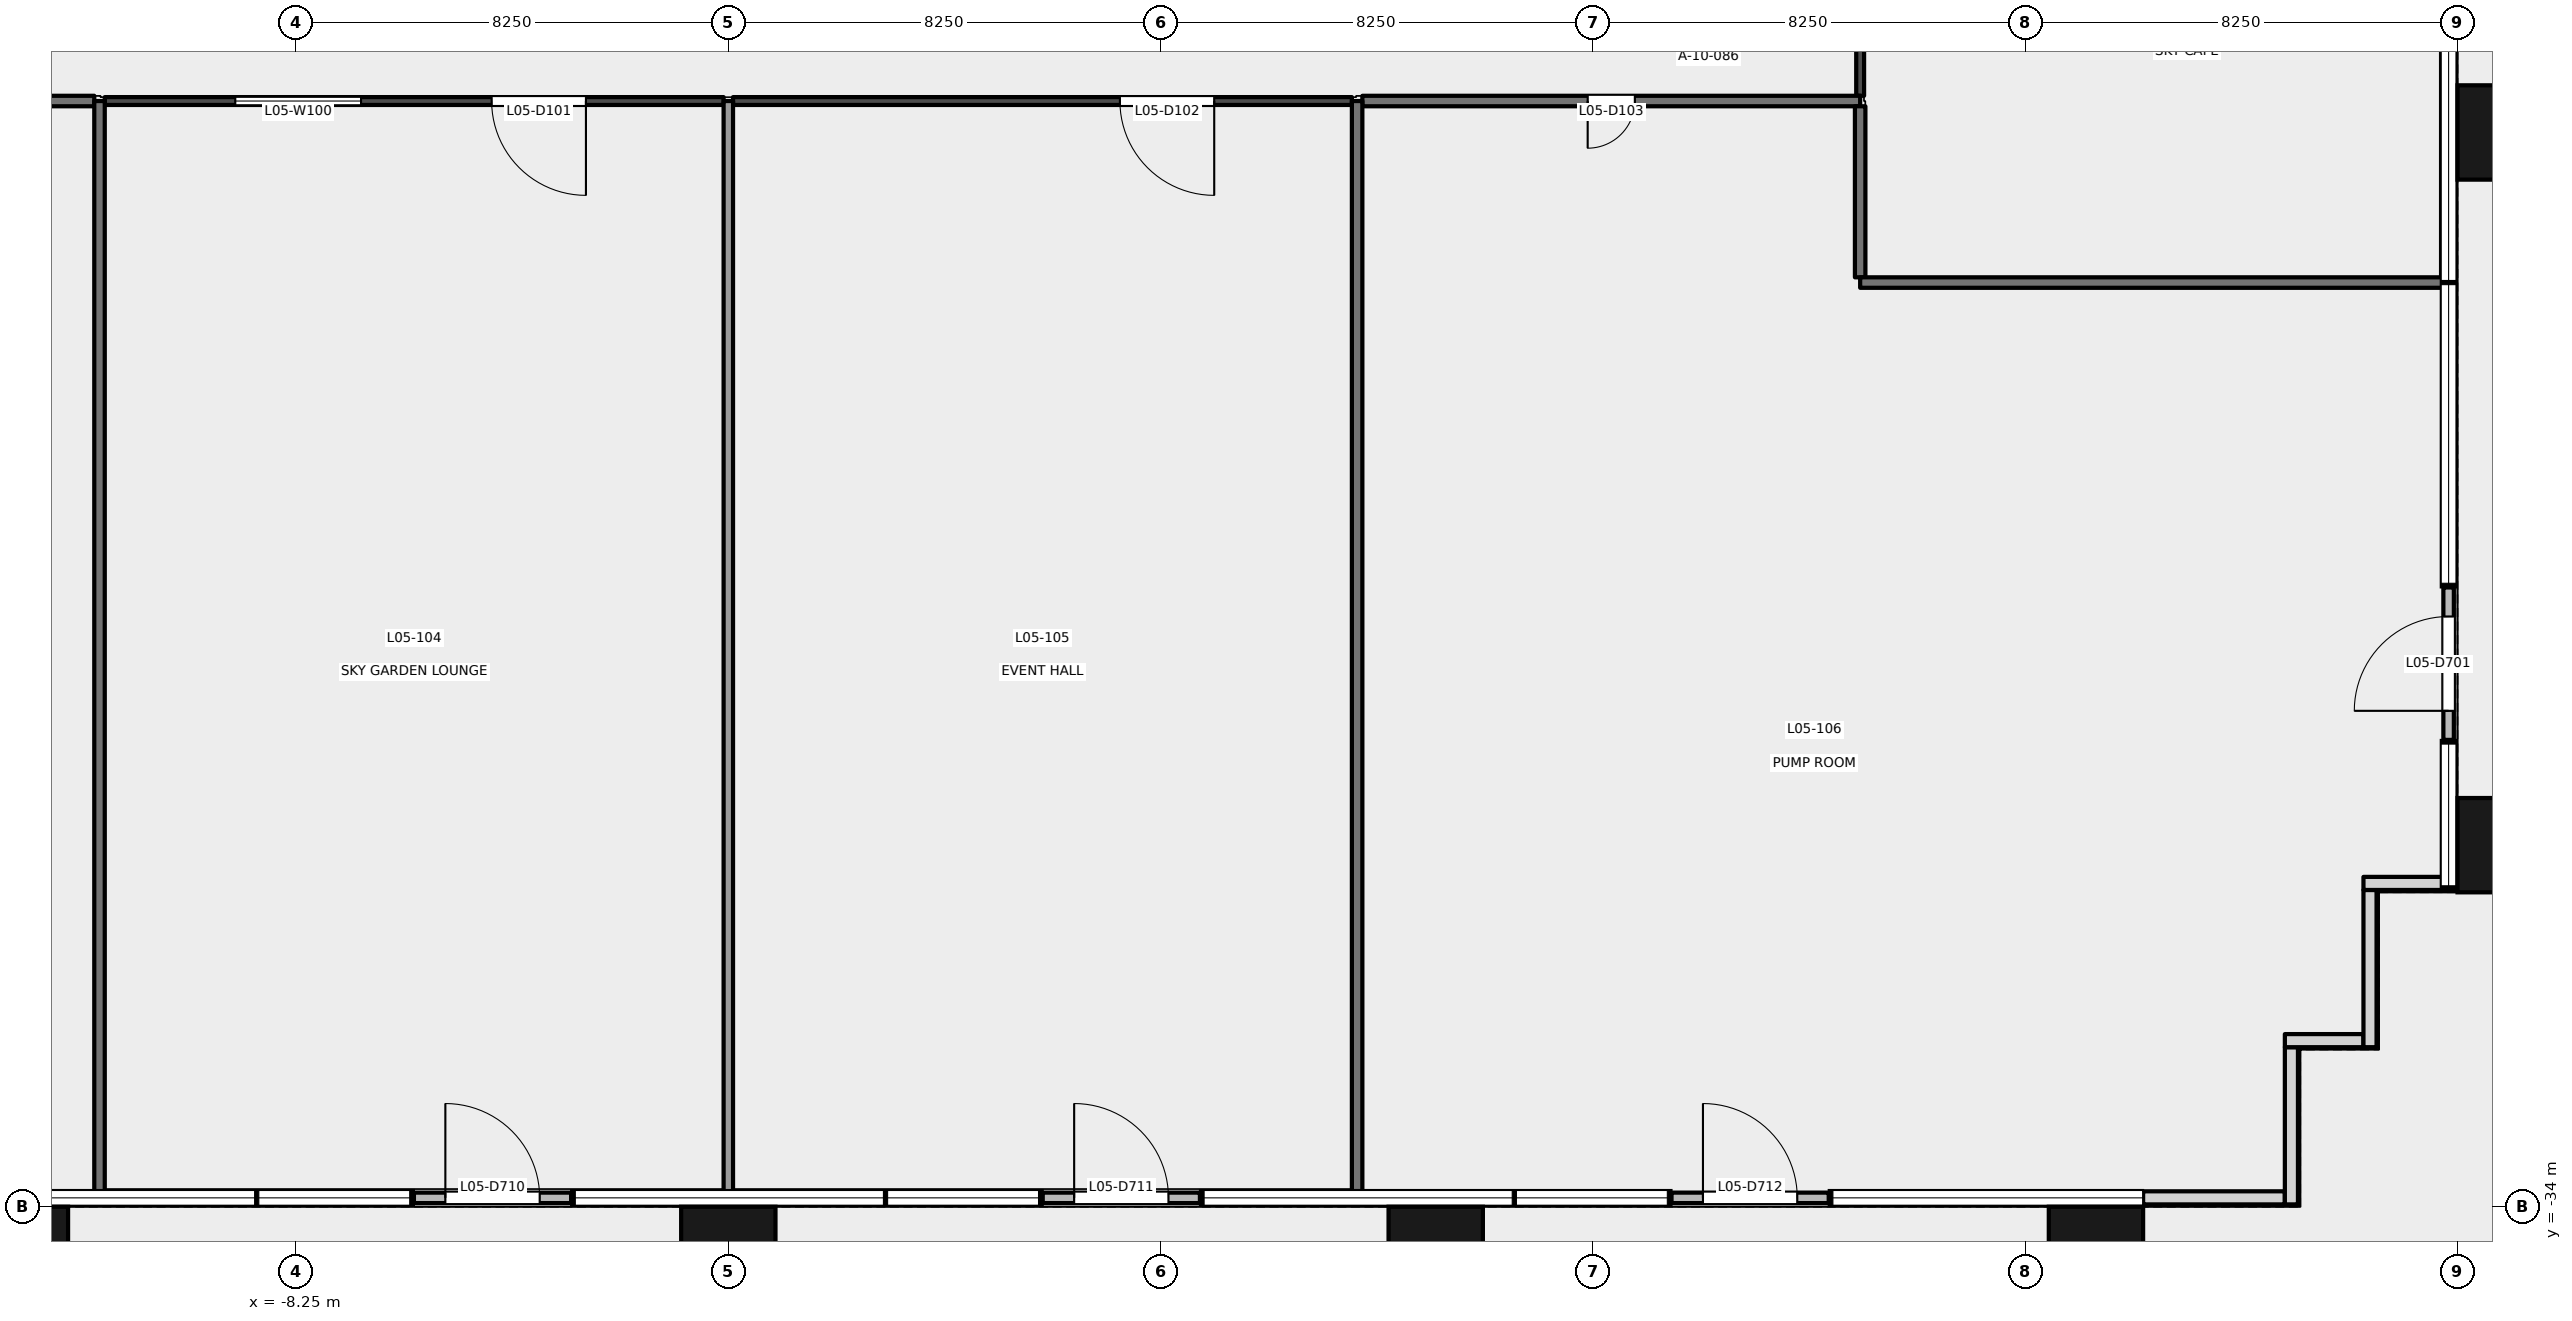
"""IFC4 building model, lengths in metres.
Left out: names, types, materials, properties, quantities, classifications, styles, units other than length and angle.
Written with IfcOpenShell. Run it as: python <this file> out.ifc"""

import sys

from ifc_helpers import new_model, si_unit, direction, frame, frame_2d, origin, origin_2d, place, context, subcontext, project, spatial, rectangle, extrude, element, fill, save


model = new_model("IFC4")
c1 = context("Model", 3, precision=1e-05, world=origin(), true_north=direction((0.0, 1.0)))
c2 = subcontext(c1, "Body", "Model", "MODEL_VIEW")
j1 = project(units=[si_unit("LENGTHUNIT", "METRE"), si_unit("PLANEANGLEUNIT", "RADIAN")], contexts=[c1])
p1 = place(None, origin())
s1 = spatial("IfcSite", under=j1, at=p1, CompositionType="ELEMENT")
p2 = place(p1, origin())
s2 = spatial("IfcBuilding", under=s1, at=p2, CompositionType="ELEMENT")
p3 = place(p2, frame((0.0, 0.0, 27.0)))
s3 = spatial("IfcBuildingStorey", under=s2, at=p3, CompositionType="ELEMENT", Elevation=27.0)
for number, where, z_axis, x_axis in (
    (1, (-13.5, -34.9, -0.2), (0.0, 0.0, 1.0), (1.0, 0.0, 0.0)),
    (2, (0.0, -34.9, -0.2), (0.0, 0.0, 1.0), (1.0, 0.0, 0.0)),
    (3, (13.5, -34.9, -0.2), (0.0, 0.0, 1.0), (1.0, 0.0, 0.0)),
    (4, (26.1, -34.9, -0.2), (0.0, 0.0, 1.0), (1.0, 0.0, 0.0)),
    (5, (33.9, -27.1, -0.2), (0.0, 0.0, 1.0), (0.0, 1.0, 0.0)),
    (6, (33.9, -13.5, -0.2), (0.0, 0.0, 1.0), (0.0, 1.0, 0.0)),
):
    element("IfcColumn", number, at=place(p3, frame(where, z_axis=z_axis, x_axis=x_axis)), inside=s3, PredefinedType="COLUMN", context=c2, shape_type="SweptSolid", body=[
        extrude(rectangle(XDim=1.8, YDim=1.8, at=origin_2d()), origin(), (0.0, 0.0, 1.0), 5.4),
    ])
p4 = place(p3, frame((27.0, -33.83, 0.0), z_axis=(0.0, 0.0, 1.0), x_axis=(1.0, 0.0, 0.0)))
e7 = element("IfcWall", 7, at=p4, inside=s3, PredefinedType="SOLIDWALL", context=c2, shape_type="SweptSolid", body=[
    extrude(rectangle(XDim=2.705, YDim=0.25, at=frame_2d((1.353, 0.0))), origin(), (0.0, 0.0, 1.0), 5.2),
])
p5 = place(p3, frame((29.83, -33.955, 0.0), z_axis=(0.0, 0.0, 1.0), x_axis=(0.0, 1.0, 0.0)))
e8 = element("IfcWall", 8, at=p5, inside=s3, PredefinedType="SOLIDWALL", context=c2, shape_type="SweptSolid", body=[
    extrude(rectangle(XDim=3.0, YDim=0.25, at=frame_2d((1.5, 0.0))), origin(), (0.0, 0.0, 1.0), 5.2),
])
p6 = place(p3, frame((29.705, -30.83, 0.0), z_axis=(0.0, 0.0, 1.0), x_axis=(1.0, 0.0, 0.0)))
e9 = element("IfcWall", 9, at=p6, inside=s3, PredefinedType="SOLIDWALL", context=c2, shape_type="SweptSolid", body=[
    extrude(rectangle(XDim=1.5, YDim=0.25, at=frame_2d((0.75, 0.0))), origin(), (0.0, 0.0, 1.0), 5.2),
])
p7 = place(p3, frame((31.33, -30.955, 0.0), z_axis=(0.0, 0.0, 1.0), x_axis=(0.0, 1.0, 0.0)))
e10 = element("IfcWall", 10, at=p7, inside=s3, PredefinedType="SOLIDWALL", context=c2, shape_type="SweptSolid", body=[
    extrude(rectangle(XDim=3.0, YDim=0.25, at=frame_2d((1.5, 0.0))), origin(), (0.0, 0.0, 1.0), 5.2),
])
p8 = place(p3, frame((31.205, -27.83, 0.0), z_axis=(0.0, 0.0, 1.0), x_axis=(1.0, 0.0, 0.0)))
e11 = element("IfcWall", 11, at=p8, inside=s3, PredefinedType="SOLIDWALL", context=c2, shape_type="SweptSolid", body=[
    extrude(rectangle(XDim=1.8, YDim=0.25, at=frame_2d((0.9, 0.0))), origin(), (0.0, 0.0, 1.0), 5.2),
])
p9 = place(p3, frame((32.83, -25.091, 0.0), z_axis=(0.0, 0.0, 1.0), x_axis=(0.0, 1.0, 0.0)))
e12 = element("IfcWall", 12, at=p9, inside=s3, PredefinedType="SOLIDWALL", context=c2, shape_type="SweptSolid", body=[
    extrude(rectangle(XDim=2.909, YDim=0.2, at=frame_2d((1.455, 0.0))), origin(), (0.0, 0.0, 1.0), 4.1),
])
p10 = place(p9, frame((0.554, 0.0, 0.0)))
e13 = element("IfcOpeningElement", 13, at=p10, cuts=e12, PredefinedType="OPENING", context=c2, shape_type="SweptSolid", body=[
    extrude(rectangle(XDim=1.8, YDim=2.4, at=frame_2d((0.9, 1.2))), frame((0.0, 0.111, 0.0), z_axis=(0.0, -1.0, 0.0), x_axis=(1.0, 0.0, 0.0)), (0.0, 0.0, 1.0), 0.221),
])
p11 = place(p3, frame((-6.0, -33.83, 0.0), z_axis=(0.0, 0.0, 1.0), x_axis=(1.0, 0.0, 0.0)))
e14 = element("IfcWall", 14, at=p11, inside=s3, PredefinedType="SOLIDWALL", context=c2, shape_type="SweptSolid", body=[
    extrude(rectangle(XDim=3.0, YDim=0.2, at=frame_2d((1.5, 0.0))), origin(), (0.0, 0.0, 1.0), 4.1),
])
p12 = place(p11, frame((0.6, 0.0, 0.0)))
e15 = element("IfcOpeningElement", 15, at=p12, cuts=e14, PredefinedType="OPENING", context=c2, shape_type="SweptSolid", body=[
    extrude(rectangle(XDim=1.8, YDim=2.4, at=frame_2d((0.9, 1.2))), frame((0.0, 0.111, 0.0), z_axis=(0.0, -1.0, 0.0), x_axis=(1.0, 0.0, 0.0)), (0.0, 0.0, 1.0), 0.221),
])
p13 = place(p3, frame((6.0, -33.83, 0.0), z_axis=(0.0, 0.0, 1.0), x_axis=(1.0, 0.0, 0.0)))
e16 = element("IfcWall", 16, at=p13, inside=s3, PredefinedType="SOLIDWALL", context=c2, shape_type="SweptSolid", body=[
    extrude(rectangle(XDim=3.0, YDim=0.2, at=frame_2d((1.5, 0.0))), origin(), (0.0, 0.0, 1.0), 4.1),
])
p14 = place(p13, frame((0.6, 0.0, 0.0)))
e17 = element("IfcOpeningElement", 17, at=p14, cuts=e16, PredefinedType="OPENING", context=c2, shape_type="SweptSolid", body=[
    extrude(rectangle(XDim=1.8, YDim=2.4, at=frame_2d((0.9, 1.2))), frame((0.0, 0.111, 0.0), z_axis=(0.0, -1.0, 0.0), x_axis=(1.0, 0.0, 0.0)), (0.0, 0.0, 1.0), 0.221),
])
p15 = place(p3, frame((18.0, -33.83, 0.0), z_axis=(0.0, 0.0, 1.0), x_axis=(1.0, 0.0, 0.0)))
e18 = element("IfcWall", 18, at=p15, inside=s3, PredefinedType="SOLIDWALL", context=c2, shape_type="SweptSolid", body=[
    extrude(rectangle(XDim=3.0, YDim=0.2, at=frame_2d((1.5, 0.0))), origin(), (0.0, 0.0, 1.0), 4.1),
])
p16 = place(p15, frame((0.6, 0.0, 0.0)))
e19 = element("IfcOpeningElement", 19, at=p16, cuts=e18, PredefinedType="OPENING", context=c2, shape_type="SweptSolid", body=[
    extrude(rectangle(XDim=1.8, YDim=2.4, at=frame_2d((0.9, 1.2))), frame((0.0, 0.111, 0.0), z_axis=(0.0, -1.0, 0.0), x_axis=(1.0, 0.0, 0.0)), (0.0, 0.0, 1.0), 0.221),
])
p17 = place(p3, frame((-0.09, -12.9, 0.0), z_axis=(0.0, 0.0, 1.0), x_axis=(-1.0, 0.0, 0.0)))
e20 = element("IfcWall", 20, at=p17, inside=s3, PredefinedType="PARTITIONING", context=c2, shape_type="SweptSolid", body=[
    extrude(rectangle(XDim=11.81, YDim=0.15, at=frame_2d((5.905, 0.0))), origin(), (0.0, 0.0, 1.0), 4.2),
])
p18 = place(p17, frame((2.627, 0.0, 0.0)))
e21 = element("IfcOpeningElement", 21, at=p18, cuts=e20, PredefinedType="OPENING", context=c2, shape_type="SweptSolid", body=[
    extrude(rectangle(XDim=1.8, YDim=2.1, at=frame_2d((0.9, 1.05))), frame((0.0, 0.085, 0.0), z_axis=(0.0, -1.0, 0.0), x_axis=(1.0, 0.0, 0.0)), (0.0, 0.0, 1.0), 0.171),
])
p19 = place(p17, frame((6.919, 0.0, 0.0)))
e22 = element("IfcOpeningElement", 22, at=p19, cuts=e20, PredefinedType="OPENING", context=c2, shape_type="SweptSolid", body=[
    extrude(rectangle(XDim=2.4, YDim=2.4, at=frame_2d((1.2, 1.2))), frame((0.0, 0.085, 0.0), z_axis=(0.0, -1.0, 0.0), x_axis=(1.0, 0.0, 0.0)), (0.0, 0.0, 1.0), 0.171),
])
p20 = place(p3, frame((11.9, -12.9, 0.0), z_axis=(0.0, 0.0, 1.0), x_axis=(-1.0, 0.0, 0.0)))
e23 = element("IfcWall", 23, at=p20, inside=s3, PredefinedType="PARTITIONING", context=c2, shape_type="SweptSolid", body=[
    extrude(rectangle(XDim=11.81, YDim=0.15, at=frame_2d((5.905, 0.0))), origin(), (0.0, 0.0, 1.0), 4.2),
])
p21 = place(p20, frame((2.627, 0.0, 0.0)))
e24 = element("IfcOpeningElement", 24, at=p21, cuts=e23, PredefinedType="OPENING", context=c2, shape_type="SweptSolid", body=[
    extrude(rectangle(XDim=1.8, YDim=2.1, at=frame_2d((0.9, 1.05))), frame((0.0, 0.085, 0.0), z_axis=(0.0, -1.0, 0.0), x_axis=(1.0, 0.0, 0.0)), (0.0, 0.0, 1.0), 0.171),
])
p22 = place(p3, frame((21.6, -12.9, 0.0), z_axis=(0.0, 0.0, 1.0), x_axis=(-1.0, 0.0, 0.0)))
e25 = element("IfcWall", 25, at=p22, inside=s3, PredefinedType="PARTITIONING", context=c2, shape_type="SweptSolid", body=[
    extrude(rectangle(XDim=9.5, YDim=0.2, at=frame_2d((4.75, 0.0))), origin(), (0.0, 0.0, 1.0), 3.8),
])
p23 = place(p22, frame((4.3, 0.0, 0.0)))
e26 = element("IfcOpeningElement", 26, at=p23, cuts=e25, PredefinedType="OPENING", context=c2, shape_type="SweptSolid", body=[
    extrude(rectangle(XDim=0.9, YDim=2.1, at=frame_2d((0.45, 1.05))), frame((0.0, 0.111, 0.0), z_axis=(0.0, -1.0, 0.0), x_axis=(1.0, 0.0, 0.0)), (0.0, 0.0, 1.0), 0.221),
])
p24 = place(p3, frame((-12.1, -12.9, 0.0), z_axis=(0.0, 0.0, 1.0), x_axis=(-1.0, 0.0, 0.0)))
e27 = element("IfcWall", 27, at=p24, inside=s3, PredefinedType="PARTITIONING", context=c2, shape_type="SweptSolid", body=[
    extrude(rectangle(XDim=9.5, YDim=0.2, at=frame_2d((4.75, 0.0))), origin(), (0.0, 0.0, 1.0), 3.8),
])
p25 = place(p24, frame((4.3, 0.0, 0.0)))
e28 = element("IfcOpeningElement", 28, at=p25, cuts=e27, PredefinedType="OPENING", context=c2, shape_type="SweptSolid", body=[
    extrude(rectangle(XDim=0.9, YDim=2.1, at=frame_2d((0.45, 1.05))), frame((0.0, 0.111, 0.0), z_axis=(0.0, -1.0, 0.0), x_axis=(1.0, 0.0, 0.0)), (0.0, 0.0, 1.0), 0.221),
])
p26 = place(p3, frame((21.6, -7.4, 0.0), z_axis=(0.0, 0.0, 1.0), x_axis=(0.0, -1.0, 0.0)))
e29 = element("IfcWall", 29, at=p26, inside=s3, PredefinedType="PARTITIONING", context=c2, shape_type="SweptSolid", body=[
    extrude(rectangle(XDim=5.4, YDim=0.15, at=frame_2d((2.7, 0.0))), origin(), (0.0, 0.0, 1.0), 4.6),
])
p27 = place(p26, frame((1.8, 0.0, 0.0)))
e30 = element("IfcOpeningElement", 30, at=p27, cuts=e29, PredefinedType="OPENING", context=c2, shape_type="SweptSolid", body=[
    extrude(rectangle(XDim=1.8, YDim=2.1, at=frame_2d((0.9, 1.05))), frame((0.0, 0.085, 0.0), z_axis=(0.0, -1.0, 0.0), x_axis=(1.0, 0.0, 0.0)), (0.0, 0.0, 1.0), 0.171),
])
p28 = place(p3, frame((0.0, -12.9, 0.0), z_axis=(0.0, 0.0, 1.0), x_axis=(0.0, -1.0, 0.0)))
e31 = element("IfcWall", 31, at=p28, inside=s3, PredefinedType="PARTITIONING", context=c2, shape_type="SweptSolid", body=[
    extrude(rectangle(XDim=20.84, YDim=0.18, at=frame_2d((10.42, 0.0))), origin(), (0.0, 0.0, 1.0), 4.2),
])
for number, where, z_axis, x_axis in (
    (32, (-12.0, -33.74, 0.0), (0.0, 0.0, 1.0), (0.0, 1.0, 0.0)),
    (33, (12.0, -12.9, 0.0), (0.0, 0.0, 1.0), (0.0, -1.0, 0.0)),
):
    element("IfcWall", number, at=place(p3, frame(where, z_axis=z_axis, x_axis=x_axis)), inside=s3, PredefinedType="PARTITIONING", context=c2, shape_type="SweptSolid", body=[
        extrude(rectangle(XDim=20.84, YDim=0.2, at=frame_2d((10.42, 0.0))), origin(), (0.0, 0.0, 1.0), 5.2),
    ])
p29 = place(p3, frame((21.6, -13.0, 0.0), z_axis=(0.0, 0.0, 1.0), x_axis=(0.0, -1.0, 0.0)))
e34 = element("IfcWall", 34, at=p29, inside=s3, PredefinedType="PARTITIONING", context=c2, shape_type="SweptSolid", body=[
    extrude(rectangle(XDim=3.264, YDim=0.2, at=frame_2d((1.632, 0.0))), origin(), (0.0, 0.0, 1.0), 4.6),
])
p30 = place(p3, frame((21.6, -16.364, 0.0), z_axis=(0.0, 0.0, 1.0), x_axis=(1.0, 0.0, 0.0)))
e35 = element("IfcWall", 35, at=p30, inside=s3, PredefinedType="PARTITIONING", context=c2, shape_type="SweptSolid", body=[
    extrude(rectangle(XDim=11.14, YDim=0.2, at=frame_2d((5.57, 0.0))), origin(), (0.0, 0.0, 1.0), 5.2),
])
p31 = place(p10, origin())
e36 = element("IfcDoor", 36, at=p31, inside=s3, OperationType="DOUBLE_DOOR_SINGLE_SWING", PredefinedType="DOOR", context=c2, shape_type="SweptSolid", body=[
    extrude(rectangle(XDim=1.8, YDim=2.4, at=frame_2d((0.9, 1.2))), frame((0.0, 0.025, 0.0), z_axis=(0.0, -1.0, 0.0), x_axis=(1.0, 0.0, 0.0)), (0.0, 0.0, 1.0), 0.05),
])
fill(e13, e36)
p32 = place(p12, origin())
e37 = element("IfcDoor", 37, at=p32, inside=s3, OperationType="DOUBLE_DOOR_SINGLE_SWING", PredefinedType="DOOR", context=c2, shape_type="SweptSolid", body=[
    extrude(rectangle(XDim=1.8, YDim=2.4, at=frame_2d((0.9, 1.2))), frame((0.0, 0.025, 0.0), z_axis=(0.0, -1.0, 0.0), x_axis=(1.0, 0.0, 0.0)), (0.0, 0.0, 1.0), 0.05),
])
fill(e15, e37)
p33 = place(p14, origin())
e38 = element("IfcDoor", 38, at=p33, inside=s3, OperationType="DOUBLE_DOOR_SINGLE_SWING", PredefinedType="DOOR", context=c2, shape_type="SweptSolid", body=[
    extrude(rectangle(XDim=1.8, YDim=2.4, at=frame_2d((0.9, 1.2))), frame((0.0, 0.025, 0.0), z_axis=(0.0, -1.0, 0.0), x_axis=(1.0, 0.0, 0.0)), (0.0, 0.0, 1.0), 0.05),
])
fill(e17, e38)
p34 = place(p16, origin())
e39 = element("IfcDoor", 39, at=p34, inside=s3, OperationType="DOUBLE_DOOR_SINGLE_SWING", PredefinedType="DOOR", context=c2, shape_type="SweptSolid", body=[
    extrude(rectangle(XDim=1.8, YDim=2.4, at=frame_2d((0.9, 1.2))), frame((0.0, 0.025, 0.0), z_axis=(0.0, -1.0, 0.0), x_axis=(1.0, 0.0, 0.0)), (0.0, 0.0, 1.0), 0.05),
])
fill(e19, e39)
p35 = place(p18, origin())
e40 = element("IfcDoor", 40, at=p35, inside=s3, OperationType="DOUBLE_DOOR_SINGLE_SWING", PredefinedType="DOOR", context=c2, shape_type="SweptSolid", body=[
    extrude(rectangle(XDim=1.8, YDim=2.1, at=frame_2d((0.9, 1.05))), frame((0.0, 0.025, 0.0), z_axis=(0.0, -1.0, 0.0), x_axis=(1.0, 0.0, 0.0)), (0.0, 0.0, 1.0), 0.05),
])
fill(e21, e40)
p36 = place(p21, origin())
e41 = element("IfcDoor", 41, at=p36, inside=s3, OperationType="DOUBLE_DOOR_SINGLE_SWING", PredefinedType="DOOR", context=c2, shape_type="SweptSolid", body=[
    extrude(rectangle(XDim=1.8, YDim=2.1, at=frame_2d((0.9, 1.05))), frame((0.0, 0.025, 0.0), z_axis=(0.0, -1.0, 0.0), x_axis=(1.0, 0.0, 0.0)), (0.0, 0.0, 1.0), 0.05),
])
fill(e24, e41)
p37 = place(p23, origin())
e42 = element("IfcDoor", 42, at=p37, inside=s3, OperationType="SINGLE_SWING_RIGHT", PredefinedType="DOOR", context=c2, shape_type="SweptSolid", body=[
    extrude(rectangle(XDim=0.9, YDim=2.1, at=frame_2d((0.45, 1.05))), frame((0.0, 0.025, 0.0), z_axis=(0.0, -1.0, 0.0), x_axis=(1.0, 0.0, 0.0)), (0.0, 0.0, 1.0), 0.05),
])
fill(e26, e42)
p38 = place(p19, origin())
e43 = element("IfcWindow", 43, at=p38, inside=s3, PartitioningType="SINGLE_PANEL", PredefinedType="WINDOW", context=c2, shape_type="SweptSolid", body=[
    extrude(rectangle(XDim=2.4, YDim=2.4, at=frame_2d((1.2, 1.2))), frame((0.0, 0.03, 0.0), z_axis=(0.0, -1.0, 0.0), x_axis=(1.0, 0.0, 0.0)), (0.0, 0.0, 1.0), 0.06),
])
fill(e22, e43)
save(model, sys.argv[1])
